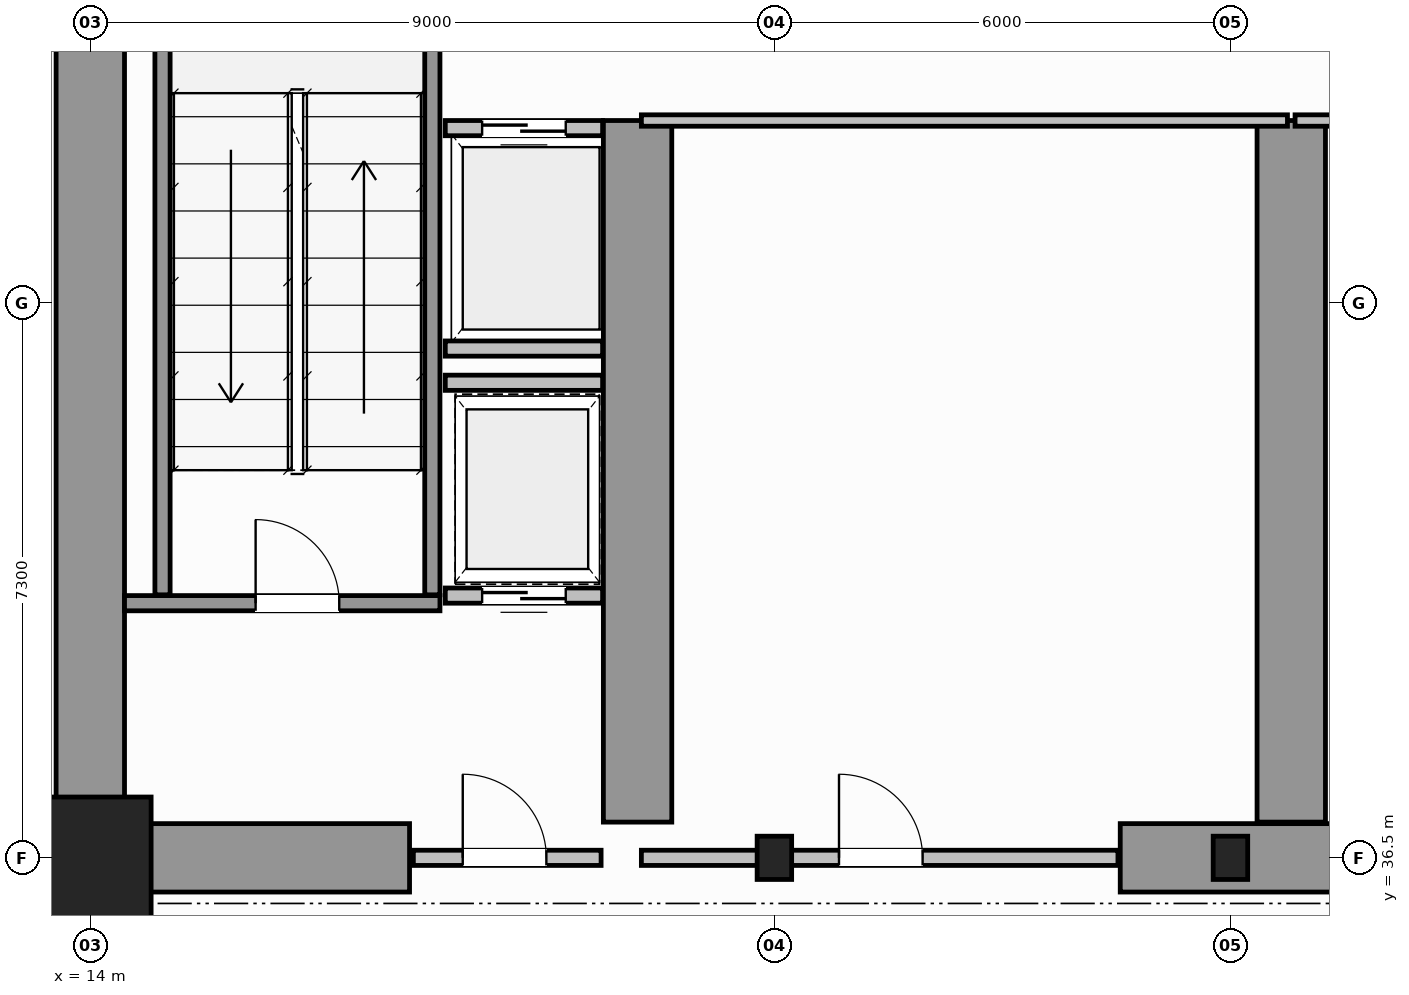
"""IFC4 building model, lengths in metres.
Left out: names, types, materials, properties, quantities, classifications, styles, units other than length and angle.
Written with IfcOpenShell. Run it as: python <this file> out.ifc"""

import sys

from ifc_helpers import new_model, si_unit, direction, frame, frame_2d, origin, origin_2d, place, context, subcontext, project, spatial, rectangle, i_section, extrude, source, transform, mapped, element, fill, save


model = new_model("IFC4")
c1 = context("Model", 3, precision=1e-05, world=origin(), true_north=direction((0.0, 1.0)))
c2 = subcontext(c1, "Body", "Model", "MODEL_VIEW")
j1 = project(units=[si_unit("LENGTHUNIT", "METRE"), si_unit("PLANEANGLEUNIT", "RADIAN")], contexts=[c1])
p1 = place(None, origin())
s1 = spatial("IfcSite", under=j1, at=p1, CompositionType="ELEMENT")
p2 = place(p1, origin())
s2 = spatial("IfcBuilding", under=s1, at=p2, CompositionType="ELEMENT")
p3 = place(p2, frame((0.0, 0.0, -10.4)))
s3 = spatial("IfcBuildingStorey", under=s2, at=p3, CompositionType="ELEMENT", Elevation=-10.4)
m1 = source(origin(), c2, "Body", "SweptSolid", [
    extrude(rectangle(XDim=1.6, YDim=1.6, at=origin_2d()), origin(), (0.0, 0.0, 1.0), 5.2),
])
p4 = place(p3, frame((14.0, 36.5, 0.0), z_axis=(0.0, 0.0, 1.0), x_axis=(1.0, 0.0, 0.0)))
e1 = element("IfcColumn", 1, at=p4, inside=s3, PredefinedType="COLUMN", context=c2, shape_type="MappedRepresentation", body=[
    mapped(m1, transform((0.0, 0.0, 0.0), scale=1.0)),
])
m2 = source(origin(), c2, "Body", "SweptSolid", [
    extrude(i_section(OverallWidth=0.454, OverallDepth=0.569, WebThickness=0.078, FlangeThickness=0.08, FilletRadius=0.015, at=origin_2d()), origin(), (0.0, 0.0, 1.0), 5.2),
])
for number, where, z_axis, x_axis in (
    (2, (23.0, 36.5, 0.0), (0.0, 0.0, 1.0), (1.0, 0.0, 0.0)),
    (3, (29.0, 36.5, 0.0), (0.0, 0.0, 1.0), (1.0, 0.0, 0.0)),
):
    element("IfcColumn", number, at=place(p3, frame(where, z_axis=z_axis, x_axis=x_axis)), inside=s3, PredefinedType="COLUMN", context=c2, shape_type="MappedRepresentation", body=[
        mapped(m2, transform((0.0, 0.0, 0.0), scale=1.0)),
    ])
p5 = place(p3, frame((14.0, 36.5, 0.0), z_axis=(0.0, 0.0, 1.0), x_axis=(0.0, 1.0, 0.0)))
e4 = element("IfcWall", 4, at=p5, inside=s3, PredefinedType="SHEAR", context=c2, shape_type="SweptSolid", body=[
    extrude(rectangle(XDim=15.0, YDim=0.9, at=frame_2d((7.5, 0.0))), origin(), (0.0, 0.0, 1.0), 5.2),
])
p6 = place(p3, frame((14.47, 36.5, 0.0), z_axis=(0.0, 0.0, 1.0), x_axis=(1.0, 0.0, 0.0)))
e5 = element("IfcWall", 5, at=p6, inside=s3, PredefinedType="SHEAR", context=c2, shape_type="SweptSolid", body=[
    extrude(rectangle(XDim=3.73, YDim=0.9, at=frame_2d((1.865, 0.0))), origin(), (0.0, 0.0, 1.0), 3.68),
])
p7 = place(p3, frame((27.55, 36.5, 0.0), z_axis=(0.0, 0.0, 1.0), x_axis=(1.0, 0.0, 0.0)))
e6 = element("IfcWall", 6, at=p7, inside=s3, PredefinedType="SHEAR", context=c2, shape_type="SweptSolid", body=[
    extrude(rectangle(XDim=4.5, YDim=0.9, at=frame_2d((2.25, 0.0))), origin(), (0.0, 0.0, 1.0), 5.2),
])
for number, where, z_axis, x_axis in (
    (7, (21.2, 36.97, 0.0), (0.0, 0.0, 1.0), (0.0, 1.0, 0.0)),
    (8, (29.8, 36.97, 0.0), (0.0, 0.0, 1.0), (0.0, 1.0, 0.0)),
):
    element("IfcWall", number, at=place(p3, frame(where, z_axis=z_axis, x_axis=x_axis)), inside=s3, PredefinedType="SHEAR", context=c2, shape_type="SweptSolid", body=[
        extrude(rectangle(XDim=9.23, YDim=0.9, at=frame_2d((4.615, 0.0))), origin(), (0.0, 0.0, 1.0), 5.2),
    ])
p8 = place(p3, frame((14.45, 39.85, 0.0), z_axis=(0.0, 0.0, 1.0), x_axis=(1.0, 0.0, 0.0)))
e9 = element("IfcWall", 9, at=p8, inside=s3, PredefinedType="SOLIDWALL", context=c2, shape_type="SweptSolid", body=[
    extrude(rectangle(XDim=4.15, YDim=0.2, at=frame_2d((2.075, 0.0))), origin(), (0.0, 0.0, 1.0), 5.2),
])
p9 = place(p8, frame((1.725, 0.0, 0.0)))
e10 = element("IfcOpeningElement", 10, at=p9, cuts=e9, PredefinedType="OPENING", context=c2, shape_type="SweptSolid", body=[
    extrude(rectangle(XDim=1.1, YDim=2.15, at=frame_2d((0.55, 1.075))), frame((0.0, 0.11, 0.0), z_axis=(0.0, -1.0, 0.0), x_axis=(1.0, 0.0, 0.0)), (0.0, 0.0, 1.0), 0.22),
])
for number, where, z_axis, x_axis in (
    (11, (14.95, 39.96, 0.0), (0.0, 0.0, 1.0), (0.0, 1.0, 0.0)),
    (12, (18.5, 39.96, 0.0), (0.0, 0.0, 1.0), (0.0, 1.0, 0.0)),
):
    element("IfcWall", number, at=place(p3, frame(where, z_axis=z_axis, x_axis=x_axis)), inside=s3, PredefinedType="SOLIDWALL", context=c2, shape_type="SweptSolid", body=[
        extrude(rectangle(XDim=9.93, YDim=0.2, at=frame_2d((4.965, 0.0))), origin(), (0.0, 0.0, 1.0), 5.2),
    ])
p10 = place(p3, frame((18.25, 36.5, 0.0), z_axis=(0.0, 0.0, 1.0), x_axis=(1.0, 0.0, 0.0)))
e13 = element("IfcWall", 13, at=p10, inside=s3, PredefinedType="SOLIDWALL", context=c2, shape_type="SweptSolid", body=[
    extrude(rectangle(XDim=2.47, YDim=0.2, at=frame_2d((1.235, 0.0))), origin(), (0.0, 0.0, 1.0), 3.67),
])
p11 = place(p10, frame((0.65, 0.0, 0.0)))
e14 = element("IfcOpeningElement", 14, at=p11, cuts=e13, PredefinedType="OPENING", context=c2, shape_type="SweptSolid", body=[
    extrude(rectangle(XDim=1.1, YDim=2.15, at=frame_2d((0.55, 1.075))), frame((0.0, 0.11, 0.0), z_axis=(0.0, -1.0, 0.0), x_axis=(1.0, 0.0, 0.0)), (0.0, 0.0, 1.0), 0.22),
])
p12 = place(p3, frame((18.67, 46.1, 0.0), z_axis=(0.0, 0.0, 1.0), x_axis=(1.0, 0.0, 0.0)))
e15 = element("IfcWall", 15, at=p12, inside=s3, PredefinedType="SOLIDWALL", context=c2, shape_type="SweptSolid", body=[
    extrude(rectangle(XDim=2.07, YDim=0.2, at=frame_2d((1.035, 0.0))), origin(), (0.0, 0.0, 1.0), 4.88),
])
p13 = place(p12, frame((0.485, 0.0, 0.0)))
e16 = element("IfcOpeningElement", 16, at=p13, cuts=e15, PredefinedType="OPENING", context=c2, shape_type="SweptSolid", body=[
    extrude(rectangle(XDim=1.1, YDim=2.15, at=frame_2d((0.55, 1.075))), frame((0.0, 0.11, 0.0), z_axis=(0.0, -1.0, 0.0), x_axis=(1.0, 0.0, 0.0)), (0.0, 0.0, 1.0), 0.22),
])
p14 = place(p3, frame((18.67, 43.2, 0.0), z_axis=(0.0, 0.0, 1.0), x_axis=(1.0, 0.0, 0.0)))
e17 = element("IfcWall", 17, at=p14, inside=s3, PredefinedType="SOLIDWALL", context=c2, shape_type="SweptSolid", body=[
    extrude(rectangle(XDim=2.07, YDim=0.2, at=frame_2d((1.035, 0.0))), origin(), (0.0, 0.0, 1.0), 4.88),
])
p15 = place(p3, frame((18.67, 39.95, 0.0), z_axis=(0.0, 0.0, 1.0), x_axis=(1.0, 0.0, 0.0)))
e18 = element("IfcWall", 18, at=p15, inside=s3, PredefinedType="SOLIDWALL", context=c2, shape_type="SweptSolid", body=[
    extrude(rectangle(XDim=2.07, YDim=0.2, at=frame_2d((1.035, 0.0))), origin(), (0.0, 0.0, 1.0), 4.88),
])
p16 = place(p15, frame((0.485, 0.0, 0.0)))
e19 = element("IfcOpeningElement", 19, at=p16, cuts=e18, PredefinedType="OPENING", context=c2, shape_type="SweptSolid", body=[
    extrude(rectangle(XDim=1.1, YDim=2.15, at=frame_2d((0.55, 1.075))), frame((0.0, 0.11, 0.0), z_axis=(0.0, -1.0, 0.0), x_axis=(1.0, 0.0, 0.0)), (0.0, 0.0, 1.0), 0.22),
])
p17 = place(p3, frame((18.67, 42.75, 0.0), z_axis=(0.0, 0.0, 1.0), x_axis=(1.0, 0.0, 0.0)))
e20 = element("IfcWall", 20, at=p17, inside=s3, PredefinedType="SOLIDWALL", context=c2, shape_type="SweptSolid", body=[
    extrude(rectangle(XDim=2.07, YDim=0.2, at=frame_2d((1.035, 0.0))), origin(), (0.0, 0.0, 1.0), 4.88),
])
p18 = place(p3, frame((21.25, 36.5, 0.0), z_axis=(0.0, 0.0, 1.0), x_axis=(1.0, 0.0, 0.0)))
e21 = element("IfcWall", 21, at=p18, inside=s3, PredefinedType="SOLIDWALL", context=c2, shape_type="SweptSolid", body=[
    extrude(rectangle(XDim=6.27, YDim=0.2, at=frame_2d((3.135, 0.0))), origin(), (0.0, 0.0, 1.0), 3.67),
])
p19 = place(p18, frame((2.6, 0.0, 0.0)))
e22 = element("IfcOpeningElement", 22, at=p19, cuts=e21, PredefinedType="OPENING", context=c2, shape_type="SweptSolid", body=[
    extrude(rectangle(XDim=1.1, YDim=2.15, at=frame_2d((0.55, 1.075))), frame((0.0, 0.11, 0.0), z_axis=(0.0, -1.0, 0.0), x_axis=(1.0, 0.0, 0.0)), (0.0, 0.0, 1.0), 0.22),
])
for number, where, z_axis, x_axis in (
    (23, (21.25, 46.2, 0.0), (0.0, 0.0, 1.0), (1.0, 0.0, 0.0)),
    (24, (29.85, 46.2, 0.0), (0.0, 0.0, 1.0), (1.0, 0.0, 0.0)),
):
    element("IfcWall", number, at=place(p3, frame(where, z_axis=z_axis, x_axis=x_axis)), inside=s3, PredefinedType="PARTITIONING", context=c2, shape_type="SweptSolid", body=[
        extrude(rectangle(XDim=8.5, YDim=0.15, at=frame_2d((4.25, 0.0))), origin(), (0.0, 0.0, 1.0), 4.88),
    ])
m3 = source(origin(), c2, "Body", "SweptSolid", [
    extrude(rectangle(XDim=1.1, YDim=2.15, at=frame_2d((0.55, 1.075))), frame((0.0, 0.025, 0.0), z_axis=(0.0, -1.0, 0.0), x_axis=(1.0, 0.0, 0.0)), (0.0, 0.0, 1.0), 0.05),
])
p20 = place(p9, origin())
e25 = element("IfcDoor", 25, at=p20, inside=s3, OperationType="SINGLE_SWING_LEFT", PredefinedType="DOOR", context=c2, shape_type="MappedRepresentation", body=[
    mapped(m3, transform((0.0, 0.0, 0.0), scale=1.0)),
])
fill(e10, e25)
p21 = place(p11, origin())
e26 = element("IfcDoor", 26, at=p21, inside=s3, OperationType="SINGLE_SWING_RIGHT", PredefinedType="DOOR", context=c2, shape_type="MappedRepresentation", body=[
    mapped(m3, transform((0.0, 0.0, 0.0), scale=1.0)),
])
fill(e14, e26)
p22 = place(p13, origin())
e27 = element("IfcDoor", 27, at=p22, inside=s3, OperationType="DOUBLE_DOOR_SLIDING", PredefinedType="DOOR", context=c2, shape_type="MappedRepresentation", body=[
    mapped(m3, transform((0.0, 0.0, 0.0), scale=1.0)),
])
fill(e16, e27)
p23 = place(p16, origin())
e28 = element("IfcDoor", 28, at=p23, inside=s3, OperationType="DOUBLE_DOOR_SLIDING", PredefinedType="DOOR", context=c2, shape_type="MappedRepresentation", body=[
    mapped(m3, transform((0.0, 0.0, 0.0), scale=1.0)),
])
fill(e19, e28)
p24 = place(p19, origin())
e29 = element("IfcDoor", 29, at=p24, inside=s3, OperationType="SINGLE_SWING_LEFT", PredefinedType="DOOR", context=c2, shape_type="MappedRepresentation", body=[
    mapped(m3, transform((0.0, 0.0, 0.0), scale=1.0)),
])
fill(e22, e29)
save(model, sys.argv[1])
